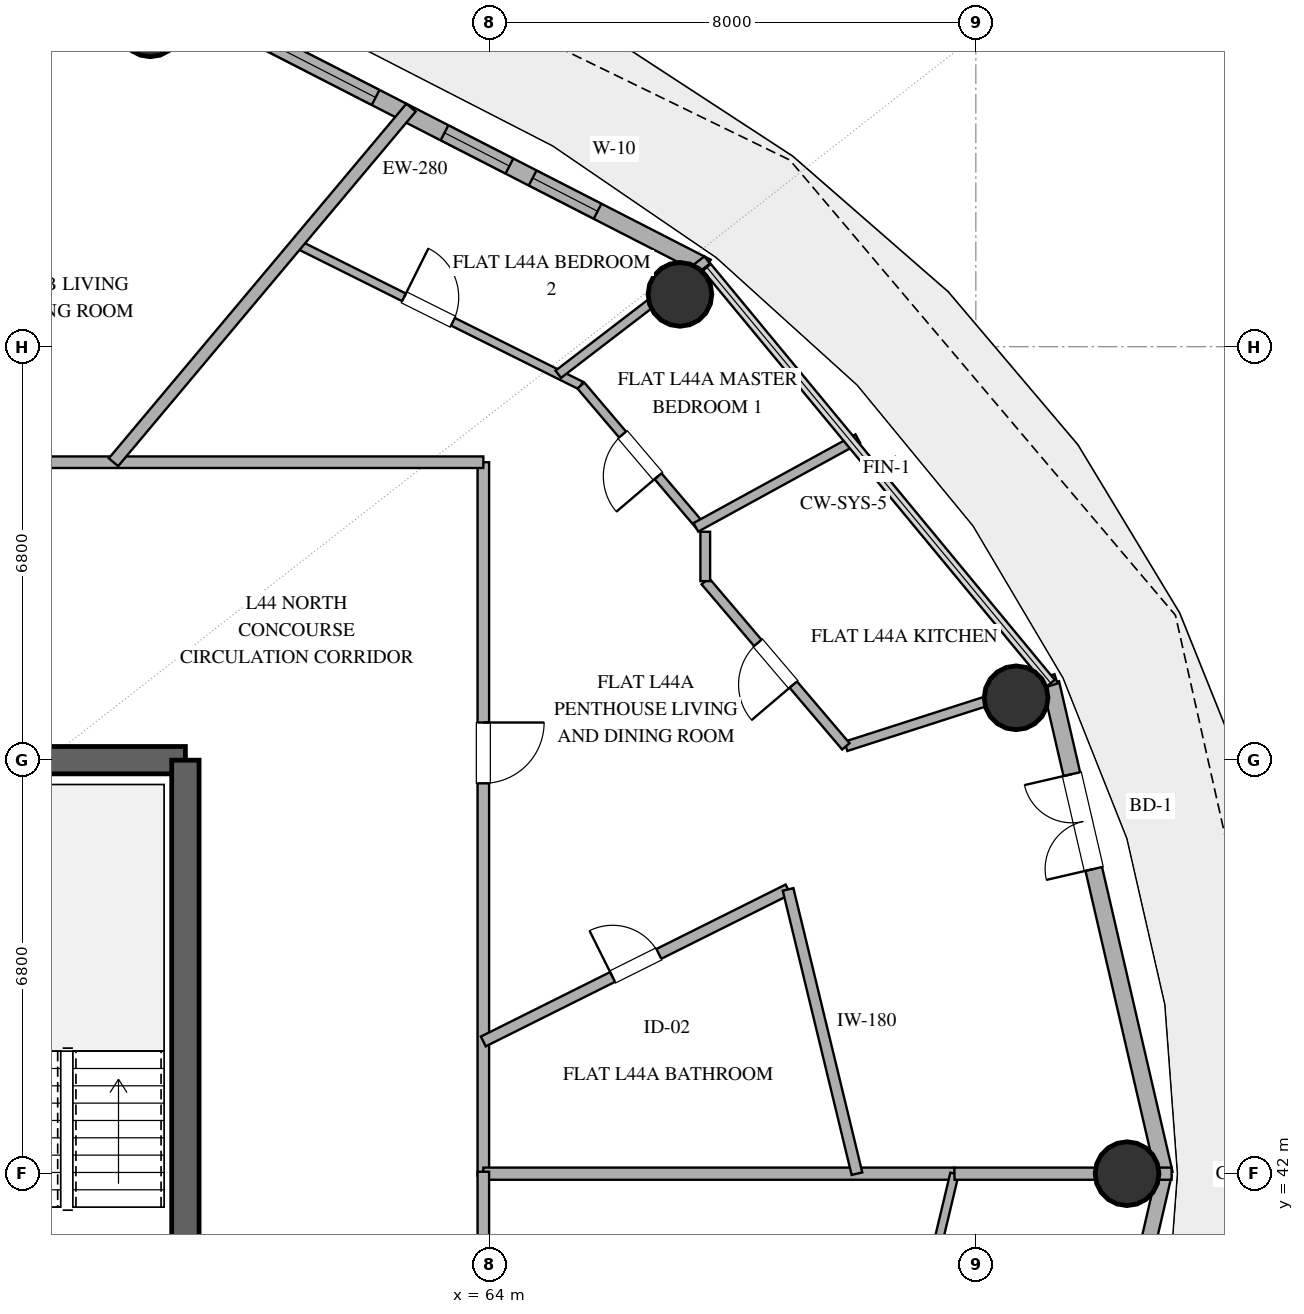
"""IFC4 building model, lengths in metres.
Left out: names, types, materials, properties, quantities, classifications, styles, units other than length and angle.
Written with IfcOpenShell. Run it as: python <this file> out.ifc"""

import sys

from ifc_helpers import new_model, si_unit, direction, frame, frame_2d, origin, origin_2d, place, context, subcontext, project, spatial, rectangle, hollow_circle, extrude, element, fill, save


model = new_model("IFC4")
c1 = context("Model", 3, precision=1e-05, world=origin(), true_north=direction((0.0, 1.0)))
c2 = subcontext(c1, "Body", "Model", "MODEL_VIEW")
j1 = project(units=[si_unit("LENGTHUNIT", "METRE"), si_unit("PLANEANGLEUNIT", "RADIAN")], contexts=[c1])
p1 = place(None, origin())
s1 = spatial("IfcSite", under=j1, at=p1, CompositionType="ELEMENT")
p2 = place(p1, origin())
s2 = spatial("IfcBuilding", under=s1, at=p2, CompositionType="ELEMENT")
p3 = place(p2, frame((0.0, 0.0, 175.8)))
s3 = spatial("IfcBuildingStorey", under=s2, at=p3, CompositionType="ELEMENT", Elevation=175.8)
p4 = place(p3, frame((55.0, 48.8, 0.0), z_axis=(0.0, 0.0, 1.0), x_axis=(1.0, 0.0, 0.0)))
e1 = element("IfcWall", 1, at=p4, inside=s3, PredefinedType="SHEAR", context=c2, shape_type="SweptSolid", body=[
    extrude(rectangle(XDim=4.0, YDim=0.45, at=frame_2d((2.0, 0.0))), origin(), (0.0, 0.0, 1.0), 3.38),
])
p5 = place(p3, frame((59.0, 35.2, 0.0), z_axis=(0.0, 0.0, 1.0), x_axis=(0.0, 1.0, 0.0)))
e2 = element("IfcWall", 2, at=p5, inside=s3, PredefinedType="SHEAR", context=c2, shape_type="SweptSolid", body=[
    extrude(rectangle(XDim=13.6, YDim=0.45, at=frame_2d((6.8, 0.0))), origin(), (0.0, 0.0, 1.0), 3.38),
])
for number, where, z_axis, x_axis in (
    (3, (74.487, 42.0, 0.0), (0.0, 0.0, 1.0), (1.0, 0.0, 0.0)),
    (4, (72.662, 49.826, 0.0), (0.0, 0.0, 1.0), (1.0, 0.0, 0.0)),
    (5, (67.134, 56.46, 0.0), (0.0, 0.0, 1.0), (1.0, 0.0, 0.0)),
    (6, (58.422, 60.893, 0.0), (0.0, 0.0, 1.0), (1.0, 0.0, 0.0)),
):
    element("IfcColumn", number, at=place(p3, frame(where, z_axis=z_axis, x_axis=x_axis)), inside=s3, PredefinedType="COLUMN", context=c2, shape_type="SweptSolid", body=[
        extrude(hollow_circle(Radius=0.525, WallThickness=0.028, at=origin_2d()), origin(), (0.0, 0.0, 1.0), 3.38),
    ])
p6 = place(p3, frame((75.099, 42.0, 0.0), z_axis=(0.0, 0.0, 1.0), x_axis=(-0.225473184558, 0.974249374157, 0.0)))
e7 = element("IfcWall", 7, at=p6, inside=s3, PredefinedType="SOLIDWALL", context=c2, shape_type="SweptSolid", body=[
    extrude(rectangle(XDim=8.28, YDim=0.28, at=frame_2d((4.14, 0.0))), origin(), (0.0, 0.0, 1.0), 3.38),
])
p7 = place(p6, frame((5.144, 0.0, 0.0)))
e8 = element("IfcOpeningElement", 8, at=p7, cuts=e7, PredefinedType="OPENING", context=c2, shape_type="SweptSolid", body=[
    extrude(rectangle(XDim=1.6, YDim=2.25, at=frame_2d((0.8, 1.125))), frame((0.0, 0.15, 0.0), z_axis=(0.0, -1.0, 0.0), x_axis=(1.0, 0.0, 0.0)), (0.0, 0.0, 1.0), 0.3),
])
p8 = place(p3, frame((67.576, 56.906, 0.0), z_axis=(0.0, 0.0, 1.0), x_axis=(-0.889872523182, 0.456209263919, 0.0)))
e9 = element("IfcWall", 9, at=p8, inside=s3, PredefinedType="SOLIDWALL", context=c2, shape_type="SweptSolid", body=[
    extrude(rectangle(XDim=10.016, YDim=0.28, at=frame_2d((5.008, 0.0))), origin(), (0.0, 0.0, 1.0), 3.38),
])
p9 = place(p8, frame((2.019, 0.0, 0.85)))
e10 = element("IfcOpeningElement", 10, at=p9, cuts=e9, PredefinedType="OPENING", context=c2, shape_type="SweptSolid", body=[
    extrude(rectangle(XDim=1.2, YDim=1.6, at=frame_2d((0.6, 0.8))), frame((0.0, 0.15, 0.0), z_axis=(0.0, -1.0, 0.0), x_axis=(1.0, 0.0, 0.0)), (0.0, 0.0, 1.0), 0.3),
])
p10 = place(p8, frame((3.648, 0.0, 0.85)))
e11 = element("IfcOpeningElement", 11, at=p10, cuts=e9, PredefinedType="OPENING", context=c2, shape_type="SweptSolid", body=[
    extrude(rectangle(XDim=1.2, YDim=1.6, at=frame_2d((0.6, 0.8))), frame((0.0, 0.15, 0.0), z_axis=(0.0, -1.0, 0.0), x_axis=(1.0, 0.0, 0.0)), (0.0, 0.0, 1.0), 0.3),
])
p11 = place(p8, frame((6.121, 0.0, 0.85)))
e12 = element("IfcOpeningElement", 12, at=p11, cuts=e9, PredefinedType="OPENING", context=c2, shape_type="SweptSolid", body=[
    extrude(rectangle(XDim=2.1, YDim=2.2, at=frame_2d((1.05, 1.1))), frame((0.0, 0.15, 0.0), z_axis=(0.0, -1.0, 0.0), x_axis=(1.0, 0.0, 0.0)), (0.0, 0.0, 1.0), 0.3),
])
p12 = place(p3, frame((73.232, 33.933, 0.0), z_axis=(0.0, 0.0, 1.0), x_axis=(0.225473184558, 0.974249374157, 0.0)))
e13 = element("IfcWall", 13, at=p12, inside=s3, PredefinedType="SOLIDWALL", context=c2, shape_type="SweptSolid", body=[
    extrude(rectangle(XDim=8.28, YDim=0.25, at=frame_2d((4.14, 0.0))), origin(), (0.0, 0.0, 1.0), 3.38),
])
p13 = place(p12, frame((4.797, 0.0, 0.35)))
e14 = element("IfcOpeningElement", 14, at=p13, cuts=e13, PredefinedType="OPENING", context=c2, shape_type="SweptSolid", body=[
    extrude(rectangle(XDim=1.0, YDim=1.05, at=frame_2d((0.5, 0.525))), frame((0.0, 0.135, 0.0), z_axis=(0.0, -1.0, 0.0), x_axis=(1.0, 0.0, 0.0)), (0.0, 0.0, 1.0), 0.27),
])
p14 = place(p3, frame((63.9, 53.7, 0.0), z_axis=(0.0, 0.0, 1.0), x_axis=(0.0, -1.0, 0.0)))
e15 = element("IfcWall", 15, at=p14, inside=s3, PredefinedType="PARTITIONING", context=c2, shape_type="SweptSolid", body=[
    extrude(rectangle(XDim=11.732, YDim=0.19, at=frame_2d((5.866, 0.0))), origin(), (0.0, 0.0, 1.0), 2.74),
])
p15 = place(p14, frame((4.281, 0.0, 0.0)))
e16 = element("IfcOpeningElement", 16, at=p15, cuts=e15, PredefinedType="OPENING", context=c2, shape_type="SweptSolid", body=[
    extrude(rectangle(XDim=1.0, YDim=2.2, at=frame_2d((0.5, 1.1))), frame((0.0, 0.105, 0.0), z_axis=(0.0, -1.0, 0.0), x_axis=(1.0, 0.0, 0.0)), (0.0, 0.0, 1.0), 0.21),
])
p16 = place(p3, frame((48.092, 53.7, 0.0), z_axis=(0.0, 0.0, 1.0), x_axis=(1.0, 0.0, 0.0)))
e17 = element("IfcWall", 17, at=p16, inside=s3, PredefinedType="PARTITIONING", context=c2, shape_type="SweptSolid", body=[
    extrude(rectangle(XDim=15.808, YDim=0.19, at=frame_2d((7.904, 0.0))), origin(), (0.0, 0.0, 1.0), 2.74),
])
p17 = place(p16, frame((6.109, 0.0, 0.0)))
e18 = element("IfcOpeningElement", 18, at=p17, cuts=e17, PredefinedType="OPENING", context=c2, shape_type="SweptSolid", body=[
    extrude(rectangle(XDim=1.0, YDim=2.2, at=frame_2d((0.5, 1.1))), frame((0.0, 0.105, 0.0), z_axis=(0.0, -1.0, 0.0), x_axis=(1.0, 0.0, 0.0)), (0.0, 0.0, 1.0), 0.21),
])
p18 = place(p3, frame((63.9, 42.0, 0.0), z_axis=(0.0, 0.0, 1.0), x_axis=(1.0, 0.0, 0.0)))
e19 = element("IfcWall", 19, at=p18, inside=s3, PredefinedType="PARTITIONING", context=c2, shape_type="SweptSolid", body=[
    extrude(rectangle(XDim=7.749, YDim=0.2, at=frame_2d((3.875, 0.0))), origin(), (0.0, 0.0, 1.0), 2.74),
])
p19 = place(p3, frame((63.9, 42.032, 0.0), z_axis=(0.0, 0.0, 1.0), x_axis=(0.0, -1.0, 0.0)))
e20 = element("IfcWall", 20, at=p19, inside=s3, PredefinedType="PARTITIONING", context=c2, shape_type="SweptSolid", body=[
    extrude(rectangle(XDim=11.732, YDim=0.19, at=frame_2d((5.866, 0.0))), origin(), (0.0, 0.0, 1.0), 2.74),
])
p20 = place(p3, frame((71.649, 42.0, 0.0), z_axis=(0.0, 0.0, 1.0), x_axis=(-0.231658068135, -0.972797275627, 0.0)))
e21 = element("IfcWall", 21, at=p20, inside=s3, PredefinedType="PARTITIONING", context=c2, shape_type="SweptSolid", body=[
    extrude(rectangle(XDim=7.034, YDim=0.14, at=frame_2d((3.517, 0.0))), origin(), (0.0, 0.0, 1.0), 2.74),
])
p21 = place(p20, frame((2.427, 0.0, 0.0)))
e22 = element("IfcOpeningElement", 22, at=p21, cuts=e21, PredefinedType="OPENING", context=c2, shape_type="SweptSolid", body=[
    extrude(rectangle(XDim=0.9, YDim=2.1, at=frame_2d((0.45, 1.05))), frame((0.0, 0.08, 0.0), z_axis=(0.0, -1.0, 0.0), x_axis=(1.0, 0.0, 0.0)), (0.0, 0.0, 1.0), 0.16),
])
p22 = place(p3, frame((63.9, 44.175, 0.0), z_axis=(0.0, 0.0, 1.0), x_axis=(0.894853920946, 0.446359115699, 0.0)))
e23 = element("IfcWall", 23, at=p22, inside=s3, PredefinedType="PLUMBINGWALL", context=c2, shape_type="SweptSolid", body=[
    extrude(rectangle(XDim=5.601, YDim=0.18, at=frame_2d((2.801, 0.0))), origin(), (0.0, 0.0, 1.0), 2.74),
])
p23 = place(p22, frame((2.375, 0.0, 0.0)))
e24 = element("IfcOpeningElement", 24, at=p23, cuts=e23, PredefinedType="OPENING", context=c2, shape_type="SweptSolid", body=[
    extrude(rectangle(XDim=0.85, YDim=2.1, at=frame_2d((0.425, 1.05))), frame((0.0, 0.1, 0.0), z_axis=(0.0, -1.0, 0.0), x_axis=(1.0, 0.0, 0.0)), (0.0, 0.0, 1.0), 0.2),
])
p24 = place(p3, frame((60.831, 57.291, 0.0), z_axis=(0.0, 0.0, 1.0), x_axis=(0.894950159382, -0.446166126261, 0.0)))
e25 = element("IfcWall", 25, at=p24, inside=s3, PredefinedType="PARTITIONING", context=c2, shape_type="SweptSolid", body=[
    extrude(rectangle(XDim=5.222, YDim=0.14, at=frame_2d((2.611, 0.0))), origin(), (0.0, 0.0, 1.0), 2.74),
])
p25 = place(p24, frame((1.971, 0.0, 0.0)))
e26 = element("IfcOpeningElement", 26, at=p25, cuts=e25, PredefinedType="OPENING", context=c2, shape_type="SweptSolid", body=[
    extrude(rectangle(XDim=0.9, YDim=2.1, at=frame_2d((0.45, 1.05))), frame((0.0, 0.08, 0.0), z_axis=(0.0, -1.0, 0.0), x_axis=(1.0, 0.0, 0.0)), (0.0, 0.0, 1.0), 0.16),
])
p26 = place(p3, frame((68.912, 46.675, 0.0), z_axis=(0.0, 0.0, 1.0), x_axis=(0.235459111302, -0.97188425592, 0.0)))
e27 = element("IfcWall", 27, at=p26, inside=s3, PredefinedType="PLUMBINGWALL", context=c2, shape_type="SweptSolid", body=[
    extrude(rectangle(XDim=4.81, YDim=0.18, at=frame_2d((2.405, 0.0))), origin(), (0.0, 0.0, 1.0), 2.74),
])
p27 = place(p3, frame((62.711, 59.531, 0.0), z_axis=(0.0, 0.0, 1.0), x_axis=(-0.642792619699, -0.766040239192, 0.0)))
e28 = element("IfcWall", 28, at=p27, inside=s3, PredefinedType="PARTITIONING", context=c2, shape_type="SweptSolid", body=[
    extrude(rectangle(XDim=7.613, YDim=0.2, at=frame_2d((3.806, 0.0))), origin(), (0.0, 0.0, 1.0), 2.74),
])
p28 = place(p3, frame((73.318, 50.138, 0.0), z_axis=(0.0, 0.0, 1.0), x_axis=(-0.95200546613, -0.306081022703, 0.0)))
e29 = element("IfcWall", 29, at=p28, inside=s3, PredefinedType="PLUMBINGWALL", context=c2, shape_type="SweptSolid", body=[
    extrude(rectangle(XDim=3.63, YDim=0.16, at=frame_2d((1.815, 0.0))), origin(), (0.0, 0.0, 1.0), 2.74),
])
p29 = place(p3, frame((71.649, 42.0, 0.0), z_axis=(0.0, 0.0, 1.0), x_axis=(1.0, 0.0, 0.0)))
e30 = element("IfcWall", 30, at=p29, inside=s3, PredefinedType="PARTITIONING", context=c2, shape_type="SweptSolid", body=[
    extrude(rectangle(XDim=3.571, YDim=0.2, at=frame_2d((1.785, 0.0))), origin(), (0.0, 0.0, 1.0), 2.74),
])
p30 = place(p3, frame((69.862, 49.027, 0.0), z_axis=(0.0, 0.0, 1.0), x_axis=(-0.648065435441, 0.761584658057, 0.0)))
e31 = element("IfcWall", 31, at=p30, inside=s3, PredefinedType="PLUMBINGWALL", context=c2, shape_type="SweptSolid", body=[
    extrude(rectangle(XDim=3.568, YDim=0.16, at=frame_2d((1.784, 0.0))), origin(), (0.0, 0.0, 1.0), 2.74),
])
p31 = place(p30, frame((1.334, 0.0, 0.0)))
e32 = element("IfcOpeningElement", 32, at=p31, cuts=e31, PredefinedType="OPENING", context=c2, shape_type="SweptSolid", body=[
    extrude(rectangle(XDim=0.9, YDim=2.1, at=frame_2d((0.45, 1.05))), frame((0.0, 0.09, 0.0), z_axis=(0.0, -1.0, 0.0), x_axis=(1.0, 0.0, 0.0)), (0.0, 0.0, 1.0), 0.18),
])
p32 = place(p3, frame((67.581, 57.025, 0.0), z_axis=(0.0, 0.0, 1.0), x_axis=(-0.793314658032, -0.608811837395, 0.0)))
e33 = element("IfcWall", 33, at=p32, inside=s3, PredefinedType="PARTITIONING", context=c2, shape_type="SweptSolid", body=[
    extrude(rectangle(XDim=3.086, YDim=0.15, at=frame_2d((1.543, 0.0))), origin(), (0.0, 0.0, 1.0), 2.74),
])
p33 = place(p3, frame((67.459, 52.664, 0.0), z_axis=(0.0, 0.0, 1.0), x_axis=(-0.647859881114, 0.761759525338, 0.0)))
e34 = element("IfcWall", 34, at=p33, inside=s3, PredefinedType="PARTITIONING", context=c2, shape_type="SweptSolid", body=[
    extrude(rectangle(XDim=3.016, YDim=0.15, at=frame_2d((1.508, 0.0))), origin(), (0.0, 0.0, 1.0), 2.74),
])
p34 = place(p33, frame((1.058, 0.0, 0.0)))
e35 = element("IfcOpeningElement", 35, at=p34, cuts=e34, PredefinedType="OPENING", context=c2, shape_type="SweptSolid", body=[
    extrude(rectangle(XDim=0.9, YDim=2.1, at=frame_2d((0.45, 1.05))), frame((0.0, 0.085, 0.0), z_axis=(0.0, -1.0, 0.0), x_axis=(1.0, 0.0, 0.0)), (0.0, 0.0, 1.0), 0.17),
])
p35 = place(p3, frame((67.396, 52.629, 0.0), z_axis=(0.0, 0.0, 1.0), x_axis=(0.876959960956, 0.4805634473, 0.0)))
e36 = element("IfcWall", 36, at=p35, inside=s3, PredefinedType="PLUMBINGWALL", context=c2, shape_type="SweptSolid", body=[
    extrude(rectangle(XDim=3.037, YDim=0.16, at=frame_2d((1.519, 0.0))), origin(), (0.0, 0.0, 1.0), 2.74),
])
p36 = place(p3, frame((67.55, 51.744, 0.0), z_axis=(0.0, 0.0, 1.0), x_axis=(0.0, 1.0, 0.0)))
e37 = element("IfcWall", 37, at=p36, inside=s3, PredefinedType="PLUMBINGWALL", context=c2, shape_type="SweptSolid", body=[
    extrude(rectangle(XDim=0.812, YDim=0.16, at=frame_2d((0.406, 0.0))), origin(), (0.0, 0.0, 1.0), 2.74),
])
p37 = place(p7, origin())
e38 = element("IfcDoor", 38, at=p37, inside=s3, OperationType="DOUBLE_DOOR_SINGLE_SWING", PredefinedType="DOOR", context=c2, shape_type="SweptSolid", body=[
    extrude(rectangle(XDim=1.6, YDim=2.25, at=frame_2d((0.8, 1.125))), frame((0.0, 0.025, 0.0), z_axis=(0.0, -1.0, 0.0), x_axis=(1.0, 0.0, 0.0)), (0.0, 0.0, 1.0), 0.05),
])
fill(e8, e38)
p38 = place(p9, origin())
e39 = element("IfcWindow", 39, at=p38, inside=s3, PartitioningType="SINGLE_PANEL", PredefinedType="WINDOW", context=c2, shape_type="SweptSolid", body=[
    extrude(rectangle(XDim=1.2, YDim=1.6, at=frame_2d((0.6, 0.8))), frame((0.0, 0.03, 0.0), z_axis=(0.0, -1.0, 0.0), x_axis=(1.0, 0.0, 0.0)), (0.0, 0.0, 1.0), 0.06),
])
fill(e10, e39)
p39 = place(p10, origin())
e40 = element("IfcWindow", 40, at=p39, inside=s3, PartitioningType="SINGLE_PANEL", PredefinedType="WINDOW", context=c2, shape_type="SweptSolid", body=[
    extrude(rectangle(XDim=1.2, YDim=1.6, at=frame_2d((0.6, 0.8))), frame((0.0, 0.03, 0.0), z_axis=(0.0, -1.0, 0.0), x_axis=(1.0, 0.0, 0.0)), (0.0, 0.0, 1.0), 0.06),
])
fill(e11, e40)
p40 = place(p11, origin())
e41 = element("IfcWindow", 41, at=p40, inside=s3, PartitioningType="SINGLE_PANEL", PredefinedType="WINDOW", context=c2, shape_type="SweptSolid", body=[
    extrude(rectangle(XDim=2.1, YDim=2.2, at=frame_2d((1.05, 1.1))), frame((0.0, 0.03, 0.0), z_axis=(0.0, -1.0, 0.0), x_axis=(1.0, 0.0, 0.0)), (0.0, 0.0, 1.0), 0.06),
])
fill(e12, e41)
p41 = place(p15, origin())
e42 = element("IfcDoor", 42, at=p41, inside=s3, OperationType="SINGLE_SWING_LEFT", PredefinedType="DOOR", context=c2, shape_type="SweptSolid", body=[
    extrude(rectangle(XDim=1.0, YDim=2.2, at=frame_2d((0.5, 1.1))), frame((0.0, 0.025, 0.0), z_axis=(0.0, -1.0, 0.0), x_axis=(1.0, 0.0, 0.0)), (0.0, 0.0, 1.0), 0.05),
])
fill(e16, e42)
p42 = place(p23, origin())
e43 = element("IfcDoor", 43, at=p42, inside=s3, OperationType="SINGLE_SWING_LEFT", PredefinedType="DOOR", context=c2, shape_type="SweptSolid", body=[
    extrude(rectangle(XDim=0.85, YDim=2.1, at=frame_2d((0.425, 1.05))), frame((0.0, 0.025, 0.0), z_axis=(0.0, -1.0, 0.0), x_axis=(1.0, 0.0, 0.0)), (0.0, 0.0, 1.0), 0.05),
])
fill(e24, e43)
p43 = place(p25, origin())
e44 = element("IfcDoor", 44, at=p43, inside=s3, OperationType="SINGLE_SWING_LEFT", PredefinedType="DOOR", context=c2, shape_type="SweptSolid", body=[
    extrude(rectangle(XDim=0.9, YDim=2.1, at=frame_2d((0.45, 1.05))), frame((0.0, 0.025, 0.0), z_axis=(0.0, -1.0, 0.0), x_axis=(1.0, 0.0, 0.0)), (0.0, 0.0, 1.0), 0.05),
])
fill(e26, e44)
p44 = place(p31, origin())
e45 = element("IfcDoor", 45, at=p44, inside=s3, OperationType="SINGLE_SWING_LEFT", PredefinedType="DOOR", context=c2, shape_type="SweptSolid", body=[
    extrude(rectangle(XDim=0.9, YDim=2.1, at=frame_2d((0.45, 1.05))), frame((0.0, 0.025, 0.0), z_axis=(0.0, -1.0, 0.0), x_axis=(1.0, 0.0, 0.0)), (0.0, 0.0, 1.0), 0.05),
])
fill(e32, e45)
p45 = place(p34, origin())
e46 = element("IfcDoor", 46, at=p45, inside=s3, OperationType="SINGLE_SWING_LEFT", PredefinedType="DOOR", context=c2, shape_type="SweptSolid", body=[
    extrude(rectangle(XDim=0.9, YDim=2.1, at=frame_2d((0.45, 1.05))), frame((0.0, 0.025, 0.0), z_axis=(0.0, -1.0, 0.0), x_axis=(1.0, 0.0, 0.0)), (0.0, 0.0, 1.0), 0.05),
])
fill(e35, e46)
save(model, sys.argv[1])
